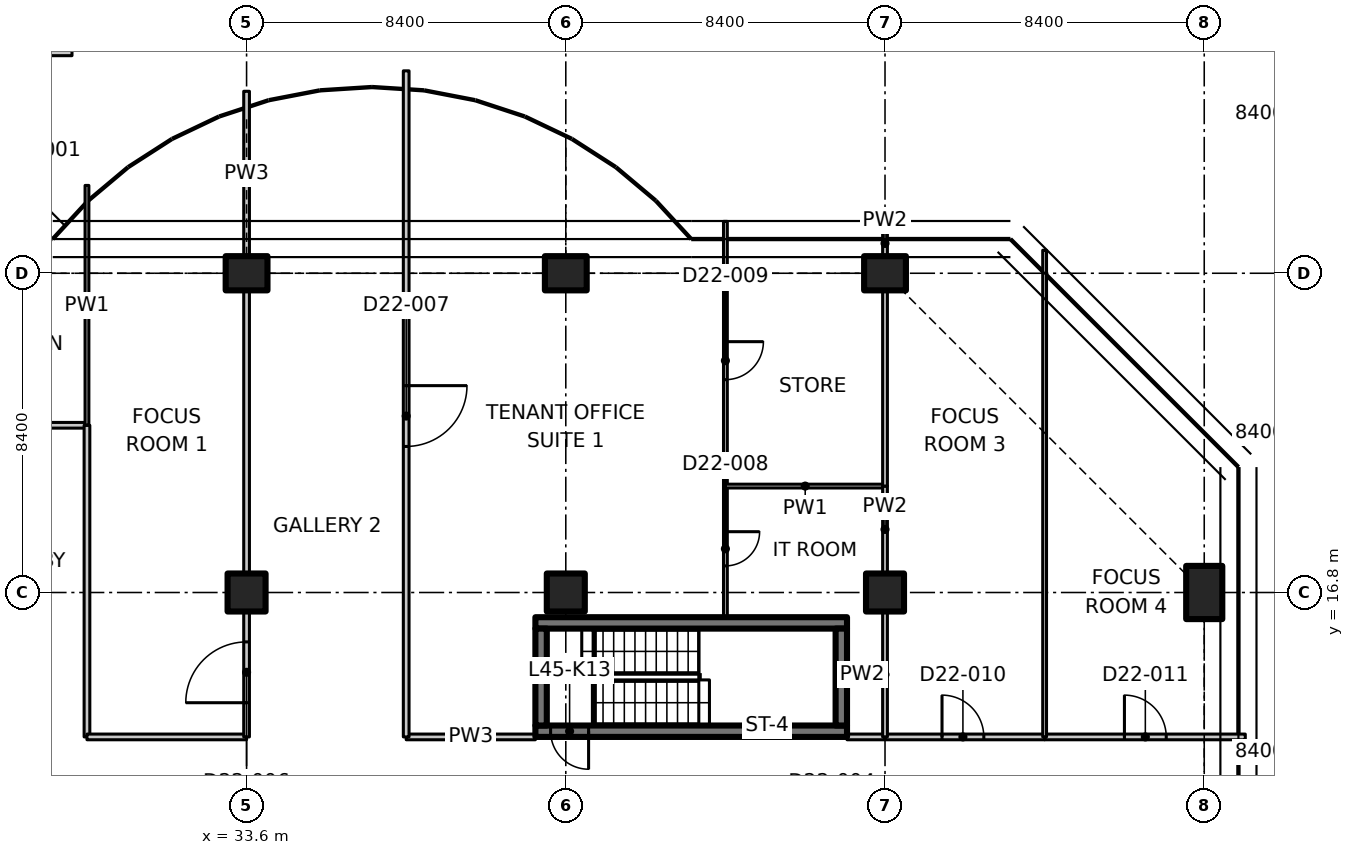
"""IFC4 building model, lengths in metres.
Left out: names, types, materials, properties, quantities, classifications, styles, units other than length and angle.
Written with IfcOpenShell. Run it as: python <this file> out.ifc"""

import sys

from ifc_helpers import new_model, si_unit, direction, frame, frame_2d, origin, origin_2d, place, context, subcontext, project, spatial, polyline, rectangle, outline, extrude, element, fill, save


model = new_model("IFC4")
c1 = context("Model", 3, precision=1e-05, world=origin(), true_north=direction((0.0, 1.0)))
c2 = subcontext(c1, "Body", "Model", "MODEL_VIEW")
j1 = project(units=[si_unit("LENGTHUNIT", "METRE"), si_unit("PLANEANGLEUNIT", "RADIAN")], contexts=[c1])
p1 = place(None, origin())
s1 = spatial("IfcSite", under=j1, at=p1, CompositionType="ELEMENT")
p2 = place(p1, origin())
s2 = spatial("IfcBuilding", under=s1, at=p2, CompositionType="ELEMENT")
p3 = place(p2, frame((0.0, 0.0, 181.2)))
s3 = spatial("IfcBuildingStorey", under=s2, at=p3, CompositionType="ELEMENT", Elevation=181.2)
p4 = place(p3, frame((33.6, 16.8, 0.0), z_axis=(0.0, 0.0, 1.0), x_axis=(1.0, 0.0, 0.0)))
e1 = element("IfcColumn", 1, at=p4, inside=s3, PredefinedType="COLUMN", context=c2, shape_type="SweptSolid", body=[
    extrude(rectangle(XDim=1.0, YDim=1.0, at=origin_2d()), origin(), (0.0, 0.0, 1.0), 3.35),
])
p5 = place(p3, frame((33.6, 25.2, 0.0), z_axis=(0.0, 0.0, 1.0), x_axis=(0.0, 1.0, 0.0)))
e2 = element("IfcColumn", 2, at=p5, inside=s3, PredefinedType="COLUMN", context=c2, shape_type="SweptSolid", body=[
    extrude(rectangle(XDim=0.9, YDim=1.1, at=origin_2d()), origin(), (0.0, 0.0, 1.0), 3.35),
])
p6 = place(p3, frame((42.0, 16.8, 0.0), z_axis=(0.0, 0.0, 1.0), x_axis=(1.0, 0.0, 0.0)))
e3 = element("IfcColumn", 3, at=p6, inside=s3, PredefinedType="COLUMN", context=c2, shape_type="SweptSolid", body=[
    extrude(rectangle(XDim=1.0, YDim=1.0, at=origin_2d()), origin(), (0.0, 0.0, 1.0), 3.35),
])
p7 = place(p3, frame((42.0, 25.2, 0.0), z_axis=(0.0, 0.0, 1.0), x_axis=(0.0, 1.0, 0.0)))
e4 = element("IfcColumn", 4, at=p7, inside=s3, PredefinedType="COLUMN", context=c2, shape_type="SweptSolid", body=[
    extrude(rectangle(XDim=0.9, YDim=1.1, at=origin_2d()), origin(), (0.0, 0.0, 1.0), 3.35),
])
p8 = place(p3, frame((50.4, 16.8, 0.0), z_axis=(0.0, 0.0, 1.0), x_axis=(1.0, 0.0, 0.0)))
e5 = element("IfcColumn", 5, at=p8, inside=s3, PredefinedType="COLUMN", context=c2, shape_type="SweptSolid", body=[
    extrude(rectangle(XDim=1.0, YDim=1.0, at=origin_2d()), origin(), (0.0, 0.0, 1.0), 3.35),
])
p9 = place(p3, frame((50.4, 25.2, 0.0), z_axis=(0.0, 0.0, 1.0), x_axis=(0.0, 1.0, 0.0)))
e6 = element("IfcColumn", 6, at=p9, inside=s3, PredefinedType="COLUMN", context=c2, shape_type="SweptSolid", body=[
    extrude(rectangle(XDim=0.9, YDim=1.1, at=origin_2d()), origin(), (0.0, 0.0, 1.0), 3.35),
])
p10 = place(p3, frame((58.8, 16.8, 0.0), z_axis=(0.0, 0.0, 1.0), x_axis=(1.0, 0.0, 0.0)))
e7 = element("IfcColumn", 7, at=p10, inside=s3, PredefinedType="COLUMN", context=c2, shape_type="SweptSolid", body=[
    extrude(rectangle(XDim=0.95, YDim=1.4, at=origin_2d()), origin(), (0.0, 0.0, 1.0), 3.35),
])
p11 = place(p3, frame((49.4, 13.15, 0.0), z_axis=(0.0, 0.0, 1.0), x_axis=(-1.0, 0.0, 0.0)))
e8 = element("IfcWall", 8, at=p11, inside=s3, PredefinedType="SHEAR", context=c2, shape_type="SweptSolid", body=[
    extrude(rectangle(XDim=8.2, YDim=0.3, at=frame_2d((4.1, 0.0))), origin(), (0.0, 0.0, 1.0), 3.35),
])
p12 = place(p11, frame((6.8, 0.0, 0.0)))
e9 = element("IfcOpeningElement", 9, at=p12, cuts=e8, PredefinedType="OPENING", context=c2, shape_type="SweptSolid", body=[
    extrude(rectangle(XDim=1.0, YDim=2.1, at=frame_2d((0.5, 1.05))), frame((0.0, 0.16, 0.0), z_axis=(0.0, -1.0, 0.0), x_axis=(1.0, 0.0, 0.0)), (0.0, 0.0, 1.0), 0.32),
])
p13 = place(p3, frame((41.2, 16.0, 0.0), z_axis=(0.0, 0.0, 1.0), x_axis=(1.0, 0.0, 0.0)))
e10 = element("IfcWall", 10, at=p13, inside=s3, PredefinedType="SHEAR", context=c2, shape_type="SweptSolid", body=[
    extrude(rectangle(XDim=8.2, YDim=0.3, at=frame_2d((4.1, 0.0))), origin(), (0.0, 0.0, 1.0), 3.35),
])
for number, where, z_axis, x_axis in (
    (11, (41.35, 13.3, 0.0), (0.0, 0.0, 1.0), (0.0, 1.0, 0.0)),
    (12, (49.25, 13.3, 0.0), (0.0, 0.0, 1.0), (0.0, 1.0, 0.0)),
):
    element("IfcWall", number, at=place(p3, frame(where, z_axis=z_axis, x_axis=x_axis)), inside=s3, PredefinedType="SHEAR", context=c2, shape_type="SweptSolid", body=[
        extrude(rectangle(XDim=2.55, YDim=0.3, at=frame_2d((1.275, 0.0))), origin(), (0.0, 0.0, 1.0), 3.35),
    ])
p14 = place(p3, frame((25.2, 21.2, 0.0), z_axis=(0.0, 0.0, 1.0), x_axis=(1.0, 0.0, 0.0)))
e13 = element("IfcWall", 13, at=p14, inside=s3, PredefinedType="PARTITIONING", context=c2, shape_type="SweptSolid", body=[
    extrude(rectangle(XDim=4.2, YDim=0.15, at=frame_2d((2.1, 0.0))), origin(), (0.0, 0.0, 1.0), 3.33),
])
p15 = place(p3, frame((29.4, 21.2, 0.0), z_axis=(0.0, 0.0, 1.0), x_axis=(0.0, -1.0, 0.0)))
e14 = element("IfcWall", 14, at=p15, inside=s3, PredefinedType="PARTITIONING", context=c2, shape_type="SweptSolid", body=[
    extrude(rectangle(XDim=8.2, YDim=0.15, at=frame_2d((4.1, 0.0))), origin(), (0.0, 0.0, 1.0), 3.33),
])
p16 = place(p3, frame((29.4, 27.511, 0.0), z_axis=(0.0, 0.0, 1.0), x_axis=(0.0, -1.0, 0.0)))
e15 = element("IfcWall", 15, at=p16, inside=s3, PredefinedType="PARTITIONING", context=c2, shape_type="SweptSolid", body=[
    extrude(outline(polyline([(0.0, 0.0), (6.311, 0.0), (6.311, 3.33), (2.761, 3.33), (2.759, 2.98), (1.863, 2.98), (1.861, 3.33), (0.236, 3.33), (0.0, 3.33), (0.0, 0.0)])), frame((0.0, 0.05, 0.0), z_axis=(0.0, -1.0, 0.0), x_axis=(1.0, 0.0, 0.0)), (0.0, 0.0, 1.0), 0.1),
])
p17 = place(p3, frame((25.2, 31.0, 0.0), z_axis=(0.0, 0.0, 1.0), x_axis=(1.0, 0.0, 0.0)))
e16 = element("IfcWall", 16, at=p17, inside=s3, PredefinedType="PARTITIONING", context=c2, shape_type="SweptSolid", body=[
    extrude(rectangle(XDim=3.806, YDim=0.15, at=frame_2d((1.903, 0.0))), origin(), (0.0, 0.0, 1.0), 2.98),
])
p18 = place(p3, frame((29.4, 13.0, 0.0), z_axis=(0.0, 0.0, 1.0), x_axis=(1.0, 0.0, 0.0)))
e17 = element("IfcWall", 17, at=p18, inside=s3, PredefinedType="PARTITIONING", context=c2, shape_type="SweptSolid", body=[
    extrude(rectangle(XDim=4.2, YDim=0.15, at=frame_2d((2.1, 0.0))), origin(), (0.0, 0.0, 1.0), 3.33),
])
p19 = place(p3, frame((37.8, 13.0, 0.0), z_axis=(0.0, 0.0, 1.0), x_axis=(1.0, 0.0, 0.0)))
e18 = element("IfcWall", 18, at=p19, inside=s3, PredefinedType="PARTITIONING", context=c2, shape_type="SweptSolid", body=[
    extrude(rectangle(XDim=3.4, YDim=0.15, at=frame_2d((1.7, 0.0))), origin(), (0.0, 0.0, 1.0), 3.33),
])
p20 = place(p3, frame((49.4, 13.0, 0.0), z_axis=(0.0, 0.0, 1.0), x_axis=(1.0, 0.0, 0.0)))
e19 = element("IfcWall", 19, at=p20, inside=s3, PredefinedType="PARTITIONING", context=c2, shape_type="SweptSolid", body=[
    extrude(rectangle(XDim=1.0, YDim=0.15, at=frame_2d((0.5, 0.0))), origin(), (0.0, 0.0, 1.0), 3.33),
])
p21 = place(p3, frame((50.4, 13.0, 0.0), z_axis=(0.0, 0.0, 1.0), x_axis=(1.0, 0.0, 0.0)))
e20 = element("IfcWall", 20, at=p21, inside=s3, PredefinedType="PARTITIONING", context=c2, shape_type="SweptSolid", body=[
    extrude(rectangle(XDim=4.2, YDim=0.15, at=frame_2d((2.1, 0.0))), origin(), (0.0, 0.0, 1.0), 3.33),
])
p22 = place(p21, frame((1.5, 0.0, 0.0)))
e21 = element("IfcOpeningElement", 21, at=p22, cuts=e20, PredefinedType="OPENING", context=c2, shape_type="SweptSolid", body=[
    extrude(rectangle(XDim=1.1, YDim=2.1, at=frame_2d((0.55, 1.05))), frame((0.0, 0.085, 0.0), z_axis=(0.0, -1.0, 0.0), x_axis=(1.0, 0.0, 0.0)), (0.0, 0.0, 1.0), 0.17),
])
p23 = place(p3, frame((54.6, 13.0, 0.0), z_axis=(0.0, 0.0, 1.0), x_axis=(1.0, 0.0, 0.0)))
e22 = element("IfcWall", 22, at=p23, inside=s3, PredefinedType="PARTITIONING", context=c2, shape_type="SweptSolid", body=[
    extrude(outline(polyline([(0.0, 0.0), (5.28, 0.0), (5.28, 3.33), (4.65, 3.33), (4.648, 2.98), (3.752, 2.98), (3.75, 3.33), (0.0, 3.33), (0.0, 0.0)])), frame((0.0, 0.075, 0.0), z_axis=(0.0, -1.0, 0.0), x_axis=(1.0, 0.0, 0.0)), (0.0, 0.0, 1.0), 0.15),
])
p24 = place(p23, frame((2.1, 0.0, 0.0)))
e23 = element("IfcOpeningElement", 23, at=p24, cuts=e22, PredefinedType="OPENING", context=c2, shape_type="SweptSolid", body=[
    extrude(rectangle(XDim=1.1, YDim=2.1, at=frame_2d((0.55, 1.05))), frame((0.0, 0.085, 0.0), z_axis=(0.0, -1.0, 0.0), x_axis=(1.0, 0.0, 0.0)), (0.0, 0.0, 1.0), 0.17),
])
p25 = place(p3, frame((33.6, 13.0, 0.0), z_axis=(0.0, 0.0, 1.0), x_axis=(0.0, 1.0, 0.0)))
e24 = element("IfcWall", 24, at=p25, inside=s3, PredefinedType="PARTITIONING", context=c2, shape_type="SweptSolid", body=[
    extrude(rectangle(XDim=3.28, YDim=0.15, at=frame_2d((1.64, 0.0))), origin(), (0.0, 0.0, 1.0), 3.33),
])
p26 = place(p25, frame((0.9, 0.0, 0.0)))
e25 = element("IfcOpeningElement", 25, at=p26, cuts=e24, PredefinedType="OPENING", context=c2, shape_type="SweptSolid", body=[
    extrude(rectangle(XDim=1.6, YDim=2.1, at=frame_2d((0.8, 1.05))), frame((0.0, 0.085, 0.0), z_axis=(0.0, -1.0, 0.0), x_axis=(1.0, 0.0, 0.0)), (0.0, 0.0, 1.0), 0.17),
])
p27 = place(p3, frame((33.6, 17.32, 0.0), z_axis=(0.0, 0.0, 1.0), x_axis=(0.0, 1.0, 0.0)))
e26 = element("IfcWall", 26, at=p27, inside=s3, PredefinedType="PARTITIONING", context=c2, shape_type="SweptSolid", body=[
    extrude(rectangle(XDim=7.41, YDim=0.15, at=frame_2d((3.705, 0.0))), origin(), (0.0, 0.0, 1.0), 3.33),
])
p28 = place(p3, frame((33.6, 25.67, 0.0), z_axis=(0.0, 0.0, 1.0), x_axis=(0.0, 1.0, 0.0)))
e27 = element("IfcWall", 27, at=p28, inside=s3, PredefinedType="PARTITIONING", context=c2, shape_type="SweptSolid", body=[
    extrude(rectangle(XDim=4.318, YDim=0.15, at=frame_2d((2.159, 0.0))), origin(), (0.0, 0.0, 1.0), 2.98),
])
p29 = place(p3, frame((37.8, 30.526, 0.0), z_axis=(0.0, 0.0, 1.0), x_axis=(0.0, -1.0, 0.0)))
e28 = element("IfcWall", 28, at=p29, inside=s3, PredefinedType="PARTITIONING", context=c2, shape_type="SweptSolid", body=[
    extrude(outline(polyline([(0.0, 0.0), (17.526, 0.0), (17.526, 3.33), (5.776, 3.33), (5.774, 2.98), (4.878, 2.98), (4.876, 3.33), (0.283, 3.33), (0.0, 3.33), (0.0, 0.0)])), frame((0.0, 0.075, 0.0), z_axis=(0.0, -1.0, 0.0), x_axis=(1.0, 0.0, 0.0)), (0.0, 0.0, 1.0), 0.15),
])
p30 = place(p29, frame((8.283, 0.0, 0.0)))
e29 = element("IfcOpeningElement", 29, at=p30, cuts=e28, PredefinedType="OPENING", context=c2, shape_type="SweptSolid", body=[
    extrude(rectangle(XDim=1.6, YDim=2.1, at=frame_2d((0.8, 1.05))), frame((0.0, 0.085, 0.0), z_axis=(0.0, -1.0, 0.0), x_axis=(1.0, 0.0, 0.0)), (0.0, 0.0, 1.0), 0.17),
])
p31 = place(p3, frame((46.2, 19.6, 0.0), z_axis=(0.0, 0.0, 1.0), x_axis=(0.0, -1.0, 0.0)))
e30 = element("IfcWall", 30, at=p31, inside=s3, PredefinedType="PARTITIONING", context=c2, shape_type="SweptSolid", body=[
    extrude(rectangle(XDim=3.45, YDim=0.1, at=frame_2d((1.725, 0.0))), origin(), (0.0, 0.0, 1.0), 3.33),
])
p32 = place(p31, frame((1.2, 0.0, 0.0)))
e31 = element("IfcOpeningElement", 31, at=p32, cuts=e30, PredefinedType="OPENING", context=c2, shape_type="SweptSolid", body=[
    extrude(rectangle(XDim=0.9, YDim=2.1, at=frame_2d((0.45, 1.05))), frame((0.0, 0.06, 0.0), z_axis=(0.0, -1.0, 0.0), x_axis=(1.0, 0.0, 0.0)), (0.0, 0.0, 1.0), 0.12),
])
p33 = place(p3, frame((46.2, 26.565, 0.0), z_axis=(0.0, 0.0, 1.0), x_axis=(0.0, -1.0, 0.0)))
e32 = element("IfcWall", 32, at=p33, inside=s3, PredefinedType="PARTITIONING", context=c2, shape_type="SweptSolid", body=[
    extrude(outline(polyline([(0.0, 0.0), (6.965, 0.0), (6.965, 3.33), (1.815, 3.33), (1.813, 2.98), (0.917, 2.98), (0.915, 3.33), (0.265, 3.33), (0.0, 3.33), (0.0, 0.0)])), frame((0.0, 0.05, 0.0), z_axis=(0.0, -1.0, 0.0), x_axis=(1.0, 0.0, 0.0)), (0.0, 0.0, 1.0), 0.1),
])
p34 = place(p33, frame((3.165, 0.0, 0.0)))
e33 = element("IfcOpeningElement", 33, at=p34, cuts=e32, PredefinedType="OPENING", context=c2, shape_type="SweptSolid", body=[
    extrude(rectangle(XDim=1.0, YDim=2.1, at=frame_2d((0.5, 1.05))), frame((0.0, 0.06, 0.0), z_axis=(0.0, -1.0, 0.0), x_axis=(1.0, 0.0, 0.0)), (0.0, 0.0, 1.0), 0.12),
])
p35 = place(p3, frame((46.2, 19.6, 0.0), z_axis=(0.0, 0.0, 1.0), x_axis=(1.0, 0.0, 0.0)))
e34 = element("IfcWall", 34, at=p35, inside=s3, PredefinedType="PARTITIONING", context=c2, shape_type="SweptSolid", body=[
    extrude(rectangle(XDim=4.2, YDim=0.1, at=frame_2d((2.1, 0.0))), origin(), (0.0, 0.0, 1.0), 3.33),
])
p36 = place(p3, frame((50.4, 19.6, 0.0), z_axis=(0.0, 0.0, 1.0), x_axis=(0.0, -1.0, 0.0)))
e35 = element("IfcWall", 35, at=p36, inside=s3, PredefinedType="PARTITIONING", context=c2, shape_type="SweptSolid", body=[
    extrude(rectangle(XDim=2.28, YDim=0.125, at=frame_2d((1.14, 0.0))), origin(), (0.0, 0.0, 1.0), 3.33),
])
p37 = place(p3, frame((50.4, 16.28, 0.0), z_axis=(0.0, 0.0, 1.0), x_axis=(0.0, -1.0, 0.0)))
e36 = element("IfcWall", 36, at=p37, inside=s3, PredefinedType="PARTITIONING", context=c2, shape_type="SweptSolid", body=[
    extrude(rectangle(XDim=3.28, YDim=0.125, at=frame_2d((1.64, 0.0))), origin(), (0.0, 0.0, 1.0), 3.33),
])
p38 = place(p3, frame((50.4, 26.3, 0.0), z_axis=(0.0, 0.0, 1.0), x_axis=(0.0, -1.0, 0.0)))
e37 = element("IfcWall", 37, at=p38, inside=s3, PredefinedType="PARTITIONING", context=c2, shape_type="SweptSolid", body=[
    extrude(rectangle(XDim=0.63, YDim=0.125, at=frame_2d((0.315, 0.0))), origin(), (0.0, 0.0, 1.0), 3.33),
])
p39 = place(p3, frame((50.4, 24.73, 0.0), z_axis=(0.0, 0.0, 1.0), x_axis=(0.0, -1.0, 0.0)))
e38 = element("IfcWall", 38, at=p39, inside=s3, PredefinedType="PARTITIONING", context=c2, shape_type="SweptSolid", body=[
    extrude(outline(polyline([(0.0, 0.0), (5.13, 0.0), (5.13, 3.33), (0.208, 3.33), (0.206, 2.98), (0.0, 2.98), (0.0, 0.0)])), frame((0.0, 0.062, 0.0), z_axis=(0.0, -1.0, 0.0), x_axis=(1.0, 0.0, 0.0)), (0.0, 0.0, 1.0), 0.125),
])
p40 = place(p3, frame((54.6, 25.805, 0.0), z_axis=(0.0, 0.0, 1.0), x_axis=(0.0, -1.0, 0.0)))
e39 = element("IfcWall", 39, at=p40, inside=s3, PredefinedType="PARTITIONING", context=c2, shape_type="SweptSolid", body=[
    extrude(outline(polyline([(0.0, 0.0), (12.805, 0.0), (12.805, 3.33), (5.471, 3.33), (5.469, 2.98), (4.142, 2.98), (4.14, 3.33), (0.406, 3.33), (0.0, 3.33), (0.0, 0.0)])), frame((0.0, 0.05, 0.0), z_axis=(0.0, -1.0, 0.0), x_axis=(1.0, 0.0, 0.0)), (0.0, 0.0, 1.0), 0.1),
])
p41 = place(p12, origin())
e40 = element("IfcDoor", 40, at=p41, inside=s3, OperationType="SINGLE_SWING_RIGHT", PredefinedType="DOOR", context=c2, shape_type="SweptSolid", body=[
    extrude(rectangle(XDim=1.0, YDim=2.1, at=frame_2d((0.5, 1.05))), frame((0.0, 0.025, 0.0), z_axis=(0.0, -1.0, 0.0), x_axis=(1.0, 0.0, 0.0)), (0.0, 0.0, 1.0), 0.05),
])
fill(e9, e40)
p42 = place(p26, origin())
e41 = element("IfcDoor", 41, at=p42, inside=s3, OperationType="DOUBLE_DOOR_SINGLE_SWING", PredefinedType="DOOR", context=c2, shape_type="SweptSolid", body=[
    extrude(rectangle(XDim=1.6, YDim=2.1, at=frame_2d((0.8, 1.05))), frame((0.0, 0.025, 0.0), z_axis=(0.0, -1.0, 0.0), x_axis=(1.0, 0.0, 0.0)), (0.0, 0.0, 1.0), 0.05),
])
fill(e25, e41)
p43 = place(p30, origin())
e42 = element("IfcDoor", 42, at=p43, inside=s3, OperationType="DOUBLE_DOOR_SINGLE_SWING", PredefinedType="DOOR", context=c2, shape_type="SweptSolid", body=[
    extrude(rectangle(XDim=1.6, YDim=2.1, at=frame_2d((0.8, 1.05))), frame((0.0, 0.025, 0.0), z_axis=(0.0, -1.0, 0.0), x_axis=(1.0, 0.0, 0.0)), (0.0, 0.0, 1.0), 0.05),
])
fill(e29, e42)
p44 = place(p32, origin())
e43 = element("IfcDoor", 43, at=p44, inside=s3, OperationType="SINGLE_SWING_LEFT", PredefinedType="DOOR", context=c2, shape_type="SweptSolid", body=[
    extrude(rectangle(XDim=0.9, YDim=2.1, at=frame_2d((0.45, 1.05))), frame((0.0, 0.025, 0.0), z_axis=(0.0, -1.0, 0.0), x_axis=(1.0, 0.0, 0.0)), (0.0, 0.0, 1.0), 0.05),
])
fill(e31, e43)
p45 = place(p34, origin())
e44 = element("IfcDoor", 44, at=p45, inside=s3, OperationType="SINGLE_SWING_LEFT", PredefinedType="DOOR", context=c2, shape_type="SweptSolid", body=[
    extrude(rectangle(XDim=1.0, YDim=2.1, at=frame_2d((0.5, 1.05))), frame((0.0, 0.025, 0.0), z_axis=(0.0, -1.0, 0.0), x_axis=(1.0, 0.0, 0.0)), (0.0, 0.0, 1.0), 0.05),
])
fill(e33, e44)
p46 = place(p22, origin())
e45 = element("IfcDoor", 45, at=p46, inside=s3, OperationType="SINGLE_SWING_LEFT", PredefinedType="DOOR", context=c2, shape_type="SweptSolid", body=[
    extrude(rectangle(XDim=1.1, YDim=2.1, at=frame_2d((0.55, 1.05))), frame((0.0, 0.025, 0.0), z_axis=(0.0, -1.0, 0.0), x_axis=(1.0, 0.0, 0.0)), (0.0, 0.0, 1.0), 0.05),
])
fill(e21, e45)
p47 = place(p24, origin())
e46 = element("IfcDoor", 46, at=p47, inside=s3, OperationType="SINGLE_SWING_LEFT", PredefinedType="DOOR", context=c2, shape_type="SweptSolid", body=[
    extrude(rectangle(XDim=1.1, YDim=2.1, at=frame_2d((0.55, 1.05))), frame((0.0, 0.025, 0.0), z_axis=(0.0, -1.0, 0.0), x_axis=(1.0, 0.0, 0.0)), (0.0, 0.0, 1.0), 0.05),
])
fill(e23, e46)
save(model, sys.argv[1])
